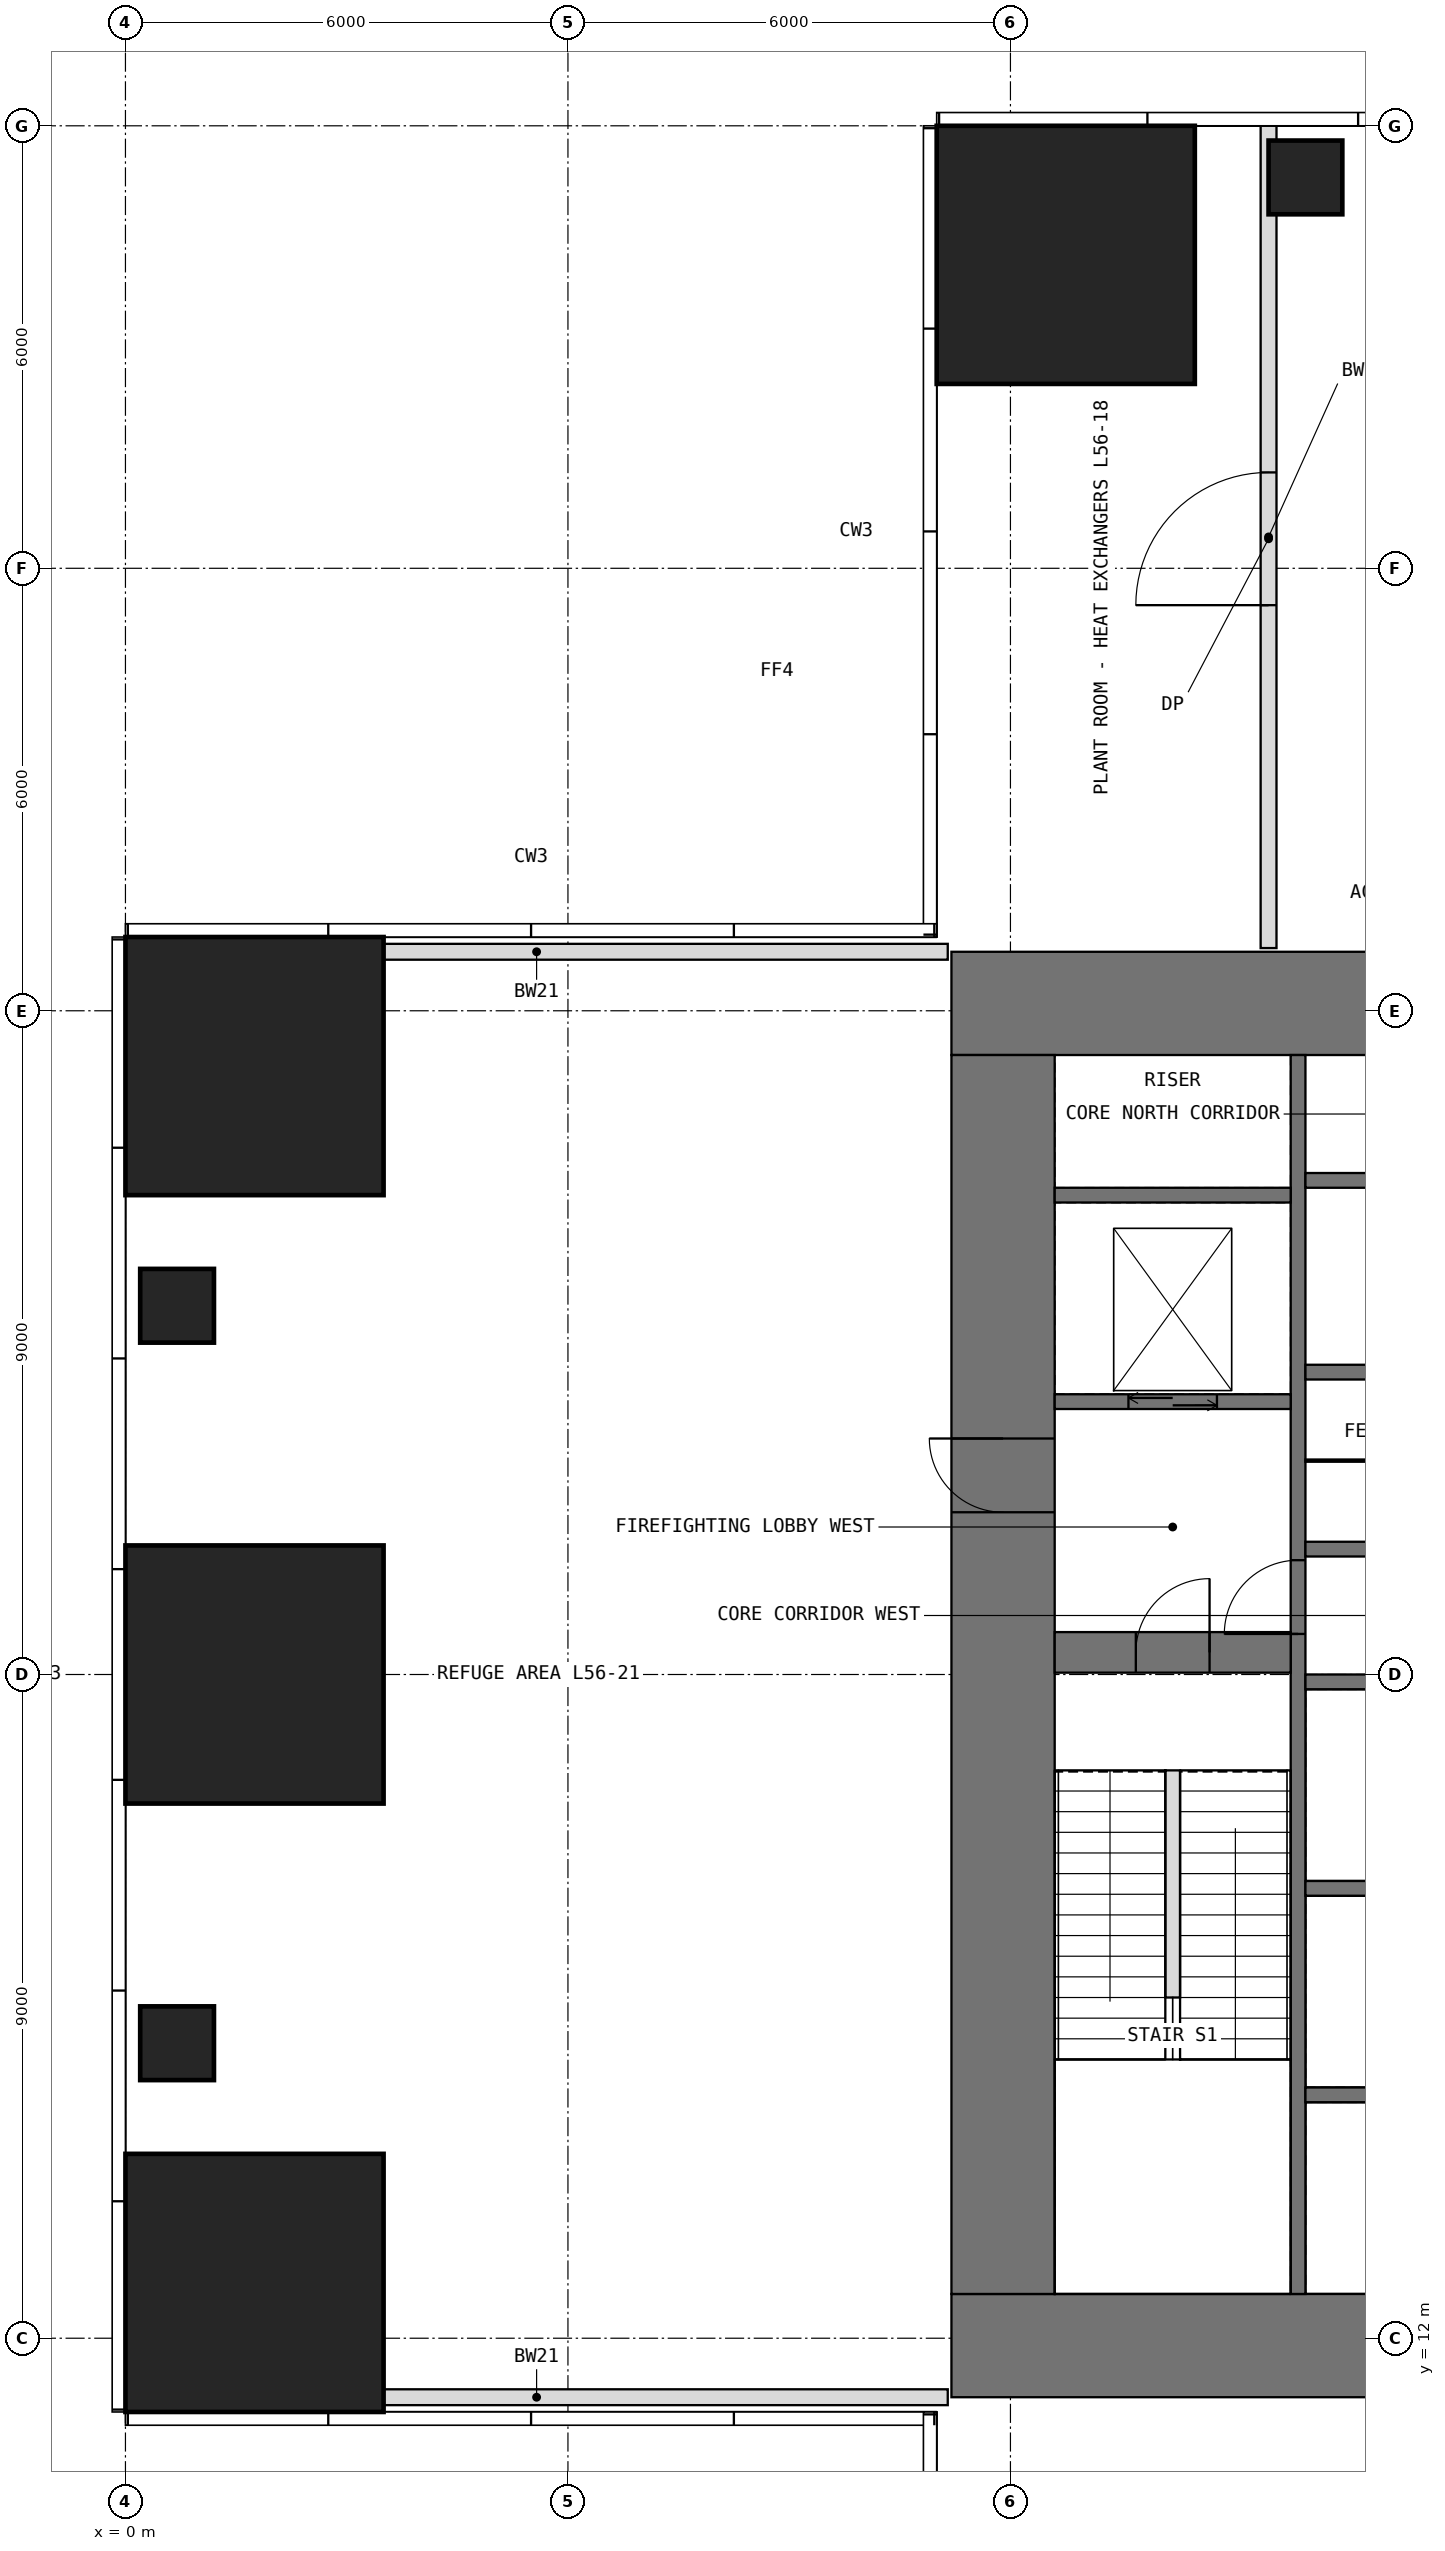
"""IFC4 building model, lengths in metres.
Left out: names, types, materials, properties, quantities, classifications, styles, units other than length and angle.
Written with IfcOpenShell. Run it as: python <this file> out.ifc"""

import sys

from ifc_helpers import new_model, si_unit, direction, frame, frame_2d, origin, origin_2d, place, context, subcontext, project, spatial, rectangle, extrude, element, fill, save


model = new_model("IFC4")
c1 = context("Model", 3, precision=1e-05, world=origin(), true_north=direction((0.0, 1.0)))
c2 = subcontext(c1, "Body", "Model", "MODEL_VIEW")
j1 = project(units=[si_unit("LENGTHUNIT", "METRE"), si_unit("PLANEANGLEUNIT", "RADIAN")], contexts=[c1])
p1 = place(None, origin())
s1 = spatial("IfcSite", under=j1, at=p1, CompositionType="ELEMENT")
p2 = place(p1, origin())
s2 = spatial("IfcBuilding", under=s1, at=p2, CompositionType="ELEMENT")
p3 = place(p2, frame((0.0, 0.0, 234.5)))
s3 = spatial("IfcBuildingStorey", under=s2, at=p3, CompositionType="ELEMENT", Elevation=234.5)
p4 = place(p3, frame((1.75, 12.75, 0.0), z_axis=(0.0, 0.0, 1.0), x_axis=(1.0, 0.0, 0.0)))
e1 = element("IfcColumn", 1, at=p4, inside=s3, PredefinedType="COLUMN", context=c2, shape_type="SweptSolid", body=[
    extrude(rectangle(XDim=3.5, YDim=3.5, at=origin_2d()), origin(), (0.0, 0.0, 1.0), 5.0),
])
p5 = place(p3, frame((0.7, 16.0, 0.0), z_axis=(0.0, 0.0, 1.0), x_axis=(1.0, 0.0, 0.0)))
e2 = element("IfcColumn", 2, at=p5, inside=s3, PredefinedType="COLUMN", context=c2, shape_type="SweptSolid", body=[
    extrude(rectangle(XDim=1.0, YDim=1.0, at=origin_2d()), origin(), (0.0, 0.0, 1.0), 5.0),
])
p6 = place(p3, frame((1.75, 21.0, 0.0), z_axis=(0.0, 0.0, 1.0), x_axis=(1.0, 0.0, 0.0)))
e3 = element("IfcColumn", 3, at=p6, inside=s3, PredefinedType="COLUMN", context=c2, shape_type="SweptSolid", body=[
    extrude(rectangle(XDim=3.5, YDim=3.5, at=origin_2d()), origin(), (0.0, 0.0, 1.0), 5.0),
])
p7 = place(p3, frame((0.7, 26.0, 0.0), z_axis=(0.0, 0.0, 1.0), x_axis=(1.0, 0.0, 0.0)))
e4 = element("IfcColumn", 4, at=p7, inside=s3, PredefinedType="COLUMN", context=c2, shape_type="SweptSolid", body=[
    extrude(rectangle(XDim=1.0, YDim=1.0, at=origin_2d()), origin(), (0.0, 0.0, 1.0), 5.0),
])
for number, where, z_axis, x_axis in (
    (5, (1.75, 29.25, 0.0), (0.0, 0.0, 1.0), (1.0, 0.0, 0.0)),
    (6, (12.75, 40.25, 0.0), (0.0, 0.0, 1.0), (1.0, 0.0, 0.0)),
):
    element("IfcColumn", number, at=place(p3, frame(where, z_axis=z_axis, x_axis=x_axis)), inside=s3, PredefinedType="COLUMN", context=c2, shape_type="SweptSolid", body=[
        extrude(rectangle(XDim=3.5, YDim=3.5, at=origin_2d()), origin(), (0.0, 0.0, 1.0), 5.0),
    ])
p8 = place(p3, frame((16.0, 41.3, 0.0), z_axis=(0.0, 0.0, 1.0), x_axis=(1.0, 0.0, 0.0)))
e7 = element("IfcColumn", 7, at=p8, inside=s3, PredefinedType="COLUMN", context=c2, shape_type="SweptSolid", body=[
    extrude(rectangle(XDim=1.0, YDim=1.0, at=origin_2d()), origin(), (0.0, 0.0, 1.0), 5.0),
])
p9 = place(p3, frame((11.2, 11.9, -0.25), z_axis=(0.0, 0.0, 1.0), x_axis=(1.0, 0.0, 0.0)))
e8 = element("IfcWall", 8, at=p9, inside=s3, PredefinedType="SHEAR", context=c2, shape_type="SweptSolid", body=[
    extrude(rectangle(XDim=19.6, YDim=1.4, at=frame_2d((9.8, 0.0))), origin(), (0.0, 0.0, 1.0), 5.2),
])
p10 = place(p9, frame((12.725, 0.0, 0.25)))
e9 = element("IfcOpeningElement", 9, at=p10, cuts=e8, PredefinedType="OPENING", context=c2, shape_type="SweptSolid", body=[
    extrude(rectangle(XDim=0.95, YDim=2.4, at=frame_2d((0.475, 1.2))), frame((0.0, 0.71, 0.0), z_axis=(0.0, -1.0, 0.0), x_axis=(1.0, 0.0, 0.0)), (0.0, 0.0, 1.0), 1.42),
])
p11 = place(p3, frame((11.2, 30.1, -0.25), z_axis=(0.0, 0.0, 1.0), x_axis=(1.0, 0.0, 0.0)))
e10 = element("IfcWall", 10, at=p11, inside=s3, PredefinedType="SHEAR", context=c2, shape_type="SweptSolid", body=[
    extrude(rectangle(XDim=19.6, YDim=1.4, at=frame_2d((9.8, 0.0))), origin(), (0.0, 0.0, 1.0), 5.2),
])
p12 = place(p11, frame((5.925, 0.0, 0.25)))
e11 = element("IfcOpeningElement", 11, at=p12, cuts=e10, PredefinedType="OPENING", context=c2, shape_type="SweptSolid", body=[
    extrude(rectangle(XDim=0.95, YDim=2.4, at=frame_2d((0.475, 1.2))), frame((0.0, 0.71, 0.0), z_axis=(0.0, -1.0, 0.0), x_axis=(1.0, 0.0, 0.0)), (0.0, 0.0, 1.0), 1.42),
])
p13 = place(p3, frame((11.9, 12.6, -0.25), z_axis=(0.0, 0.0, 1.0), x_axis=(0.0, 1.0, 0.0)))
e12 = element("IfcWall", 12, at=p13, inside=s3, PredefinedType="SHEAR", context=c2, shape_type="SweptSolid", body=[
    extrude(rectangle(XDim=16.8, YDim=1.4, at=frame_2d((8.4, 0.0))), origin(), (0.0, 0.0, 1.0), 5.2),
])
p14 = place(p13, frame((10.6, 0.0, 0.25)))
e13 = element("IfcOpeningElement", 13, at=p14, cuts=e12, PredefinedType="OPENING", context=c2, shape_type="SweptSolid", body=[
    extrude(rectangle(XDim=1.0, YDim=2.2, at=frame_2d((0.5, 1.1))), frame((0.0, 0.71, 0.0), z_axis=(0.0, -1.0, 0.0), x_axis=(1.0, 0.0, 0.0)), (0.0, 0.0, 1.0), 1.42),
])
p15 = place(p3, frame((15.9, 12.6, -0.25), z_axis=(0.0, 0.0, 1.0), x_axis=(0.0, 1.0, 0.0)))
e14 = element("IfcWall", 14, at=p15, inside=s3, PredefinedType="SHEAR", context=c2, shape_type="SweptSolid", body=[
    extrude(rectangle(XDim=16.8, YDim=0.2, at=frame_2d((8.4, 0.0))), origin(), (0.0, 0.0, 1.0), 5.2),
])
p16 = place(p15, frame((8.95, 0.0, 0.25)))
e15 = element("IfcOpeningElement", 15, at=p16, cuts=e14, PredefinedType="OPENING", context=c2, shape_type="SweptSolid", body=[
    extrude(rectangle(XDim=1.0, YDim=2.2, at=frame_2d((0.5, 1.1))), frame((0.0, 0.11, 0.0), z_axis=(0.0, -1.0, 0.0), x_axis=(1.0, 0.0, 0.0)), (0.0, 0.0, 1.0), 0.22),
])
p17 = place(p3, frame((12.6, 21.3, -0.25), z_axis=(0.0, 0.0, 1.0), x_axis=(1.0, 0.0, 0.0)))
e16 = element("IfcWall", 16, at=p17, inside=s3, PredefinedType="SHEAR", context=c2, shape_type="SweptSolid", body=[
    extrude(rectangle(XDim=3.2, YDim=0.55, at=frame_2d((1.6, 0.0))), origin(), (0.0, 0.0, 1.0), 5.2),
])
p18 = place(p17, frame((1.1, 0.0, 0.25)))
e17 = element("IfcOpeningElement", 17, at=p18, cuts=e16, PredefinedType="OPENING", context=c2, shape_type="SweptSolid", body=[
    extrude(rectangle(XDim=1.0, YDim=2.2, at=frame_2d((0.5, 1.1))), frame((0.0, 0.285, 0.0), z_axis=(0.0, -1.0, 0.0), x_axis=(1.0, 0.0, 0.0)), (0.0, 0.0, 1.0), 0.57),
])
p19 = place(p3, frame((12.6, 24.7, -0.25), z_axis=(0.0, 0.0, 1.0), x_axis=(1.0, 0.0, 0.0)))
e18 = element("IfcWall", 18, at=p19, inside=s3, PredefinedType="SHEAR", context=c2, shape_type="SweptSolid", body=[
    extrude(rectangle(XDim=3.2, YDim=0.2, at=frame_2d((1.6, 0.0))), origin(), (0.0, 0.0, 1.0), 5.2),
])
p20 = place(p19, frame((1.0, 0.0, 0.25)))
e19 = element("IfcOpeningElement", 19, at=p20, cuts=e18, PredefinedType="OPENING", context=c2, shape_type="SweptSolid", body=[
    extrude(rectangle(XDim=1.2, YDim=2.2, at=frame_2d((0.6, 1.1))), frame((0.0, 0.11, 0.0), z_axis=(0.0, -1.0, 0.0), x_axis=(1.0, 0.0, 0.0)), (0.0, 0.0, 1.0), 0.22),
])
for number, where, z_axis, x_axis in (
    (20, (12.6, 27.5, -0.25), (0.0, 0.0, 1.0), (1.0, 0.0, 0.0)),
    (21, (16.0, 15.3, -0.25), (0.0, 0.0, 1.0), (1.0, 0.0, 0.0)),
    (22, (16.0, 18.1, -0.25), (0.0, 0.0, 1.0), (1.0, 0.0, 0.0)),
    (23, (16.0, 20.9, -0.25), (0.0, 0.0, 1.0), (1.0, 0.0, 0.0)),
    (24, (16.0, 22.7, -0.25), (0.0, 0.0, 1.0), (1.0, 0.0, 0.0)),
    (25, (16.0, 25.1, -0.25), (0.0, 0.0, 1.0), (1.0, 0.0, 0.0)),
    (26, (16.0, 27.7, -0.25), (0.0, 0.0, 1.0), (1.0, 0.0, 0.0)),
):
    element("IfcWall", number, at=place(p3, frame(where, z_axis=z_axis, x_axis=x_axis)), inside=s3, PredefinedType="SHEAR", context=c2, shape_type="SweptSolid", body=[
        extrude(rectangle(XDim=3.2, YDim=0.2, at=frame_2d((1.6, 0.0))), origin(), (0.0, 0.0, 1.0), 5.2),
    ])
p21 = place(p3, frame((16.0, 23.9, 0.0), z_axis=(0.0, 0.0, 1.0), x_axis=(1.0, 0.0, 0.0)))
e27 = element("IfcWall", 27, at=p21, inside=s3, PredefinedType="PARTITIONING", context=c2, shape_type="SweptSolid", body=[
    extrude(rectangle(XDim=1.4, YDim=0.03, at=frame_2d((0.7, 0.0))), origin(), (0.0, 0.0, 1.0), 4.75),
])
for number, where, z_axis, x_axis in (
    (28, (0.0, 11.2, 0.0), (0.0, 0.0, 1.0), (1.0, 0.0, 0.0)),
    (29, (0.0, 30.8, 0.0), (0.0, 0.0, 1.0), (1.0, 0.0, 0.0)),
):
    element("IfcWall", number, at=place(p3, frame(where, z_axis=z_axis, x_axis=x_axis)), inside=s3, PredefinedType="PARTITIONING", context=c2, shape_type="SweptSolid", body=[
        extrude(rectangle(XDim=11.15, YDim=0.215, at=frame_2d((5.575, 0.0))), origin(), (0.0, 0.0, 1.0), 4.75),
    ])
p22 = place(p3, frame((15.5, 30.85, 0.0), z_axis=(0.0, 0.0, 1.0), x_axis=(0.0, 1.0, 0.0)))
e30 = element("IfcWall", 30, at=p22, inside=s3, PredefinedType="PARTITIONING", context=c2, shape_type="SweptSolid", body=[
    extrude(rectangle(XDim=11.15, YDim=0.215, at=frame_2d((5.575, 0.0))), origin(), (0.0, 0.0, 1.0), 4.75),
])
p23 = place(p22, frame((4.65, 0.0, 0.0)))
e31 = element("IfcOpeningElement", 31, at=p23, cuts=e30, PredefinedType="OPENING", context=c2, shape_type="SweptSolid", body=[
    extrude(rectangle(XDim=1.8, YDim=2.4, at=frame_2d((0.9, 1.2))), frame((0.0, 0.118, 0.0), z_axis=(0.0, -1.0, 0.0), x_axis=(1.0, 0.0, 0.0)), (0.0, 0.0, 1.0), 0.235),
])
p24 = place(p3, frame((14.2, 16.62, 0.0), z_axis=(0.0, 0.0, 1.0), x_axis=(0.0, 1.0, 0.0)))
e32 = element("IfcWall", 32, at=p24, inside=s3, PredefinedType="PARTITIONING", context=c2, shape_type="SweptSolid", body=[
    extrude(rectangle(XDim=3.08, YDim=0.2, at=frame_2d((1.54, 0.0))), origin(), (0.0, 0.0, 1.0), 5.0),
])
p25 = place(p14, origin())
e33 = element("IfcDoor", 33, at=p25, inside=s3, OperationType="SINGLE_SWING_RIGHT", PredefinedType="DOOR", context=c2, shape_type="SweptSolid", body=[
    extrude(rectangle(XDim=1.0, YDim=2.2, at=frame_2d((0.5, 1.1))), frame((0.0, 0.025, 0.0), z_axis=(0.0, -1.0, 0.0), x_axis=(1.0, 0.0, 0.0)), (0.0, 0.0, 1.0), 0.05),
])
fill(e13, e33)
p26 = place(p18, origin())
e34 = element("IfcDoor", 34, at=p26, inside=s3, OperationType="SINGLE_SWING_RIGHT", PredefinedType="DOOR", context=c2, shape_type="SweptSolid", body=[
    extrude(rectangle(XDim=1.0, YDim=2.2, at=frame_2d((0.5, 1.1))), frame((0.0, 0.025, 0.0), z_axis=(0.0, -1.0, 0.0), x_axis=(1.0, 0.0, 0.0)), (0.0, 0.0, 1.0), 0.05),
])
fill(e17, e34)
p27 = place(p16, origin())
e35 = element("IfcDoor", 35, at=p27, inside=s3, OperationType="SINGLE_SWING_LEFT", PredefinedType="DOOR", context=c2, shape_type="SweptSolid", body=[
    extrude(rectangle(XDim=1.0, YDim=2.2, at=frame_2d((0.5, 1.1))), frame((0.0, 0.025, 0.0), z_axis=(0.0, -1.0, 0.0), x_axis=(1.0, 0.0, 0.0)), (0.0, 0.0, 1.0), 0.05),
])
fill(e15, e35)
p28 = place(p23, origin())
e36 = element("IfcDoor", 36, at=p28, inside=s3, OperationType="DOUBLE_DOOR_SINGLE_SWING", PredefinedType="DOOR", context=c2, shape_type="SweptSolid", body=[
    extrude(rectangle(XDim=1.8, YDim=2.4, at=frame_2d((0.9, 1.2))), frame((0.0, 0.025, 0.0), z_axis=(0.0, -1.0, 0.0), x_axis=(1.0, 0.0, 0.0)), (0.0, 0.0, 1.0), 0.05),
])
fill(e31, e36)
p29 = place(p20, origin())
e37 = element("IfcDoor", 37, at=p29, inside=s3, OperationType="DOUBLE_DOOR_SLIDING", PredefinedType="DOOR", context=c2, shape_type="SweptSolid", body=[
    extrude(rectangle(XDim=1.2, YDim=2.2, at=frame_2d((0.6, 1.1))), frame((0.0, 0.025, 0.0), z_axis=(0.0, -1.0, 0.0), x_axis=(1.0, 0.0, 0.0)), (0.0, 0.0, 1.0), 0.05),
])
fill(e19, e37)
save(model, sys.argv[1])
